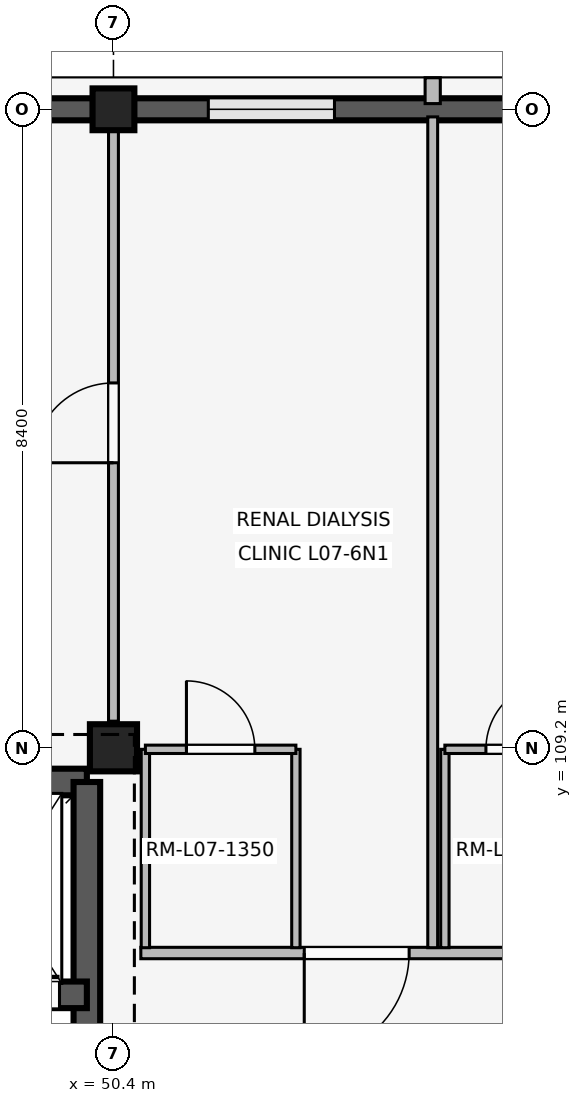
"""IFC4 building model, lengths in metres.
Left out: names, types, materials, properties, quantities, classifications, styles, units other than length and angle.
Written with IfcOpenShell. Run it as: python <this file> out.ifc"""

import sys

from ifc_helpers import new_model, si_unit, direction, frame, frame_2d, origin, origin_2d, place, context, subcontext, project, spatial, rectangle, extrude, element, fill, save


model = new_model("IFC4")
c1 = context("Model", 3, precision=1e-05, world=origin(), true_north=direction((0.0, 1.0)))
c2 = subcontext(c1, "Body", "Model", "MODEL_VIEW")
j1 = project(units=[si_unit("LENGTHUNIT", "METRE"), si_unit("PLANEANGLEUNIT", "RADIAN")], contexts=[c1])
p1 = place(None, origin())
s1 = spatial("IfcSite", under=j1, at=p1, CompositionType="ELEMENT")
p2 = place(p1, origin())
s2 = spatial("IfcBuilding", under=s1, at=p2, CompositionType="ELEMENT")
p3 = place(p2, frame((0.0, 0.0, 28.8)))
s3 = spatial("IfcBuildingStorey", under=s2, at=p3, CompositionType="ELEMENT", Elevation=28.8)
p4 = place(p3, frame((50.4, 109.2, 0.0), z_axis=(0.0, 0.0, 1.0), x_axis=(1.0, 0.0, 0.0)))
e1 = element("IfcColumn", 1, at=p4, inside=s3, PredefinedType="COLUMN", context=c2, shape_type="SweptSolid", body=[
    extrude(rectangle(XDim=0.62, YDim=0.62, at=origin_2d()), origin(), (0.0, 0.0, 1.0), 4.2),
])
p5 = place(p3, frame((50.4, 117.6, 0.0), z_axis=(0.0, 0.0, 1.0), x_axis=(1.0, 0.0, 0.0)))
e2 = element("IfcColumn", 2, at=p5, inside=s3, PredefinedType="COLUMN", context=c2, shape_type="SweptSolid", body=[
    extrude(rectangle(XDim=0.55, YDim=0.55, at=origin_2d()), origin(), (0.0, 0.0, 1.0), 4.2),
])
p6 = place(p3, frame((42.27, 117.6, 0.0), z_axis=(0.0, 0.0, 1.0), x_axis=(1.0, 0.0, 0.0)))
e3 = element("IfcWall", 3, at=p6, inside=s3, PredefinedType="SOLIDWALL", context=c2, shape_type="SweptSolid", body=[
    extrude(rectangle(XDim=7.86, YDim=0.29, at=frame_2d((3.93, 0.0))), origin(), (0.0, 0.0, 1.0), 3.34),
])
p7 = place(p6, frame((1.098, 0.0, 0.85)))
e4 = element("IfcOpeningElement", 4, at=p7, cuts=e3, PredefinedType="OPENING", context=c2, shape_type="SweptSolid", body=[
    extrude(rectangle(XDim=1.42, YDim=1.45, at=frame_2d((0.71, 0.725))), frame((0.0, 0.155, 0.0), z_axis=(0.0, -1.0, 0.0), x_axis=(1.0, 0.0, 0.0)), (0.0, 0.0, 1.0), 0.31),
])
p8 = place(p6, frame((5.342, 0.0, 0.85)))
e5 = element("IfcOpeningElement", 5, at=p8, cuts=e3, PredefinedType="OPENING", context=c2, shape_type="SweptSolid", body=[
    extrude(rectangle(XDim=1.42, YDim=1.45, at=frame_2d((0.71, 0.725))), frame((0.0, 0.155, 0.0), z_axis=(0.0, -1.0, 0.0), x_axis=(1.0, 0.0, 0.0)), (0.0, 0.0, 1.0), 0.31),
])
p9 = place(p3, frame((50.67, 117.6, 0.0), z_axis=(0.0, 0.0, 1.0), x_axis=(1.0, 0.0, 0.0)))
e6 = element("IfcWall", 6, at=p9, inside=s3, PredefinedType="SOLIDWALL", context=c2, shape_type="SweptSolid", body=[
    extrude(rectangle(XDim=7.86, YDim=0.29, at=frame_2d((3.93, 0.0))), origin(), (0.0, 0.0, 1.0), 3.34),
])
p10 = place(p9, frame((0.978, 0.0, 0.85)))
e7 = element("IfcOpeningElement", 7, at=p10, cuts=e6, PredefinedType="OPENING", context=c2, shape_type="SweptSolid", body=[
    extrude(rectangle(XDim=1.66, YDim=1.95, at=frame_2d((0.83, 0.975))), frame((0.0, 0.155, 0.0), z_axis=(0.0, -1.0, 0.0), x_axis=(1.0, 0.0, 0.0)), (0.0, 0.0, 1.0), 0.31),
])
p11 = place(p9, frame((5.222, 0.0, 0.85)))
e8 = element("IfcOpeningElement", 8, at=p11, cuts=e6, PredefinedType="OPENING", context=c2, shape_type="SweptSolid", body=[
    extrude(rectangle(XDim=1.66, YDim=1.95, at=frame_2d((0.83, 0.975))), frame((0.0, 0.155, 0.0), z_axis=(0.0, -1.0, 0.0), x_axis=(1.0, 0.0, 0.0)), (0.0, 0.0, 1.0), 0.31),
])
p12 = place(p3, frame((54.6, 117.675, 0.0), z_axis=(0.0, 0.0, 1.0), x_axis=(0.0, 1.0, 0.0)))
e9 = element("IfcWall", 9, at=p12, inside=s3, PredefinedType="ELEMENTEDWALL", context=c2, shape_type="SweptSolid", body=[
    extrude(rectangle(XDim=0.34, YDim=0.2, at=frame_2d((0.17, 0.0))), origin(), (0.0, 0.0, 1.0), 3.32),
])
p13 = place(p3, frame((42.55, 108.75, 0.0), z_axis=(0.0, 0.0, 1.0), x_axis=(1.0, 0.0, 0.0)))
e10 = element("IfcWall", 10, at=p13, inside=s3, PredefinedType="SHEAR", context=c2, shape_type="SweptSolid", body=[
    extrude(rectangle(XDim=7.5, YDim=0.35, at=frame_2d((3.75, 0.0))), origin(), (0.0, 0.0, 1.0), 3.94),
])
p14 = place(p3, frame((50.05, 101.2, 0.0), z_axis=(0.0, 0.0, 1.0), x_axis=(0.0, 1.0, 0.0)))
e11 = element("IfcWall", 11, at=p14, inside=s3, PredefinedType="SHEAR", context=c2, shape_type="SweptSolid", body=[
    extrude(rectangle(XDim=7.55, YDim=0.35, at=frame_2d((3.775, 0.0))), origin(), (0.0, 0.0, 1.0), 3.94),
])
p15 = place(p14, frame((2.4, 0.0, 0.0)))
e12 = element("IfcOpeningElement", 12, at=p15, cuts=e11, PredefinedType="OPENING", context=c2, shape_type="SweptSolid", body=[
    extrude(rectangle(XDim=1.2, YDim=2.2, at=frame_2d((0.6, 1.1))), frame((0.0, 0.185, 0.0), z_axis=(0.0, -1.0, 0.0), x_axis=(1.0, 0.0, 0.0)), (0.0, 0.0, 1.0), 0.37),
])
p16 = place(p3, frame((46.25, 105.95, 0.0), z_axis=(0.0, 0.0, 1.0), x_axis=(1.0, 0.0, 0.0)))
e13 = element("IfcWall", 13, at=p16, inside=s3, PredefinedType="SHEAR", context=c2, shape_type="SweptSolid", body=[
    extrude(rectangle(XDim=3.8, YDim=0.35, at=frame_2d((1.9, 0.0))), origin(), (0.0, 0.0, 1.0), 3.94),
])
p17 = place(p16, frame((0.32, 0.0, 0.0)))
e14 = element("IfcOpeningElement", 14, at=p17, cuts=e13, PredefinedType="OPENING", context=c2, shape_type="SweptSolid", body=[
    extrude(rectangle(XDim=1.35, YDim=2.25, at=frame_2d((0.675, 1.125))), frame((0.0, 0.185, 0.0), z_axis=(0.0, -1.0, 0.0), x_axis=(1.0, 0.0, 0.0)), (0.0, 0.0, 1.0), 0.37),
])
p18 = place(p16, frame((2.04, 0.0, 0.0)))
e15 = element("IfcOpeningElement", 15, at=p18, cuts=e13, PredefinedType="OPENING", context=c2, shape_type="SweptSolid", body=[
    extrude(rectangle(XDim=1.4, YDim=2.25, at=frame_2d((0.7, 1.125))), frame((0.0, 0.185, 0.0), z_axis=(0.0, -1.0, 0.0), x_axis=(1.0, 0.0, 0.0)), (0.0, 0.0, 1.0), 0.37),
])
p19 = place(p3, frame((50.4, 109.55, 0.0), z_axis=(0.0, 0.0, 1.0), x_axis=(0.0, 1.0, 0.0)))
e16 = element("IfcWall", 16, at=p19, inside=s3, PredefinedType="PARTITIONING", context=c2, shape_type="SweptSolid", body=[
    extrude(rectangle(XDim=7.91, YDim=0.13, at=frame_2d((3.955, 0.0))), origin(), (0.0, 0.0, 1.0), 3.32),
])
p20 = place(p19, frame((3.4, 0.0, 0.0)))
e17 = element("IfcOpeningElement", 17, at=p20, cuts=e16, PredefinedType="OPENING", context=c2, shape_type="SweptSolid", body=[
    extrude(rectangle(XDim=1.05, YDim=2.2, at=frame_2d((0.525, 1.1))), frame((0.0, 0.075, 0.0), z_axis=(0.0, -1.0, 0.0), x_axis=(1.0, 0.0, 0.0)), (0.0, 0.0, 1.0), 0.15),
])
p21 = place(p3, frame((58.72, 106.5, 0.0), z_axis=(0.0, 0.0, 1.0), x_axis=(-1.0, 0.0, 0.0)))
e18 = element("IfcWall", 18, at=p21, inside=s3, PredefinedType="PARTITIONING", context=c2, shape_type="SweptSolid", body=[
    extrude(rectangle(XDim=7.96, YDim=0.15, at=frame_2d((3.98, 0.0))), origin(), (0.0, 0.0, 1.0), 3.32),
])
p22 = place(p21, frame((0.73, 0.0, 0.0)))
e19 = element("IfcOpeningElement", 19, at=p22, cuts=e18, PredefinedType="OPENING", context=c2, shape_type="SweptSolid", body=[
    extrude(rectangle(XDim=1.38, YDim=2.25, at=frame_2d((0.69, 1.125))), frame((0.0, 0.085, 0.0), z_axis=(0.0, -1.0, 0.0), x_axis=(1.0, 0.0, 0.0)), (0.0, 0.0, 1.0), 0.17),
])
p23 = place(p21, frame((4.43, 0.0, 0.0)))
e20 = element("IfcOpeningElement", 20, at=p23, cuts=e18, PredefinedType="OPENING", context=c2, shape_type="SweptSolid", body=[
    extrude(rectangle(XDim=1.38, YDim=2.25, at=frame_2d((0.69, 1.125))), frame((0.0, 0.085, 0.0), z_axis=(0.0, -1.0, 0.0), x_axis=(1.0, 0.0, 0.0)), (0.0, 0.0, 1.0), 0.17),
])
p24 = place(p3, frame((54.6, 106.57, 0.0), z_axis=(0.0, 0.0, 1.0), x_axis=(0.0, 1.0, 0.0)))
e21 = element("IfcWall", 21, at=p24, inside=s3, PredefinedType="PARTITIONING", context=c2, shape_type="SweptSolid", body=[
    extrude(rectangle(XDim=10.93, YDim=0.13, at=frame_2d((5.465, 0.0))), origin(), (0.0, 0.0, 1.0), 3.32),
])
for number, where, z_axis, x_axis in (
    (22, (50.82, 106.57, 0.0), (0.0, 0.0, 1.0), (0.0, 1.0, 0.0)),
    (23, (52.8, 106.57, 0.0), (0.0, 0.0, 1.0), (0.0, 1.0, 0.0)),
):
    element("IfcWall", number, at=place(p3, frame(where, z_axis=z_axis, x_axis=x_axis)), inside=s3, PredefinedType="PARTITIONING", context=c2, shape_type="SweptSolid", body=[
        extrude(rectangle(XDim=2.61, YDim=0.11, at=frame_2d((1.305, 0.0))), origin(), (0.0, 0.0, 1.0), 3.32),
    ])
p25 = place(p3, frame((50.82, 109.18, 0.0), z_axis=(0.0, 0.0, 1.0), x_axis=(1.0, 0.0, 0.0)))
e24 = element("IfcWall", 24, at=p25, inside=s3, PredefinedType="PARTITIONING", context=c2, shape_type="SweptSolid", body=[
    extrude(rectangle(XDim=1.98, YDim=0.11, at=frame_2d((0.99, 0.0))), origin(), (0.0, 0.0, 1.0), 3.32),
])
p26 = place(p25, frame((0.54, 0.0, 0.0)))
e25 = element("IfcOpeningElement", 25, at=p26, cuts=e24, PredefinedType="OPENING", context=c2, shape_type="SweptSolid", body=[
    extrude(rectangle(XDim=0.9, YDim=2.1, at=frame_2d((0.45, 1.05))), frame((0.0, 0.065, 0.0), z_axis=(0.0, -1.0, 0.0), x_axis=(1.0, 0.0, 0.0)), (0.0, 0.0, 1.0), 0.13),
])
p27 = place(p3, frame((54.76, 106.57, 0.0), z_axis=(0.0, 0.0, 1.0), x_axis=(0.0, 1.0, 0.0)))
e26 = element("IfcWall", 26, at=p27, inside=s3, PredefinedType="PARTITIONING", context=c2, shape_type="SweptSolid", body=[
    extrude(rectangle(XDim=2.61, YDim=0.11, at=frame_2d((1.305, 0.0))), origin(), (0.0, 0.0, 1.0), 3.32),
])
p28 = place(p3, frame((54.76, 109.18, 0.0), z_axis=(0.0, 0.0, 1.0), x_axis=(1.0, 0.0, 0.0)))
e27 = element("IfcWall", 27, at=p28, inside=s3, PredefinedType="PARTITIONING", context=c2, shape_type="SweptSolid", body=[
    extrude(rectangle(XDim=1.98, YDim=0.11, at=frame_2d((0.99, 0.0))), origin(), (0.0, 0.0, 1.0), 3.32),
])
p29 = place(p28, frame((0.54, 0.0, 0.0)))
e28 = element("IfcOpeningElement", 28, at=p29, cuts=e27, PredefinedType="OPENING", context=c2, shape_type="SweptSolid", body=[
    extrude(rectangle(XDim=0.9, YDim=2.1, at=frame_2d((0.45, 1.05))), frame((0.0, 0.065, 0.0), z_axis=(0.0, -1.0, 0.0), x_axis=(1.0, 0.0, 0.0)), (0.0, 0.0, 1.0), 0.13),
])
p30 = place(p10, origin())
e29 = element("IfcWindow", 29, at=p30, inside=s3, PartitioningType="SINGLE_PANEL", PredefinedType="WINDOW", context=c2, shape_type="SweptSolid", body=[
    extrude(rectangle(XDim=1.66, YDim=1.95, at=frame_2d((0.83, 0.975))), frame((0.0, 0.03, 0.0), z_axis=(0.0, -1.0, 0.0), x_axis=(1.0, 0.0, 0.0)), (0.0, 0.0, 1.0), 0.06),
])
fill(e7, e29)
p31 = place(p18, origin())
e30 = element("IfcDoor", 30, at=p31, inside=s3, OperationType="SLIDING_TO_LEFT", PredefinedType="DOOR", context=c2, shape_type="SweptSolid", body=[
    extrude(rectangle(XDim=1.4, YDim=2.25, at=frame_2d((0.7, 1.125))), frame((0.0, 0.025, 0.0), z_axis=(0.0, -1.0, 0.0), x_axis=(1.0, 0.0, 0.0)), (0.0, 0.0, 1.0), 0.05),
])
fill(e15, e30)
p32 = place(p20, origin())
e31 = element("IfcDoor", 31, at=p32, inside=s3, OperationType="SINGLE_SWING_LEFT", PredefinedType="DOOR", context=c2, shape_type="SweptSolid", body=[
    extrude(rectangle(XDim=1.05, YDim=2.2, at=frame_2d((0.525, 1.1))), frame((0.0, 0.025, 0.0), z_axis=(0.0, -1.0, 0.0), x_axis=(1.0, 0.0, 0.0)), (0.0, 0.0, 1.0), 0.05),
])
fill(e17, e31)
p33 = place(p23, origin())
e32 = element("IfcDoor", 32, at=p33, inside=s3, OperationType="SINGLE_SWING_RIGHT", PredefinedType="DOOR", context=c2, shape_type="SweptSolid", body=[
    extrude(rectangle(XDim=1.38, YDim=2.25, at=frame_2d((0.69, 1.125))), frame((0.0, 0.025, 0.0), z_axis=(0.0, -1.0, 0.0), x_axis=(1.0, 0.0, 0.0)), (0.0, 0.0, 1.0), 0.05),
])
fill(e20, e32)
p34 = place(p26, origin())
e33 = element("IfcDoor", 33, at=p34, inside=s3, OperationType="SINGLE_SWING_LEFT", PredefinedType="DOOR", context=c2, shape_type="SweptSolid", body=[
    extrude(rectangle(XDim=0.9, YDim=2.1, at=frame_2d((0.45, 1.05))), frame((0.0, 0.025, 0.0), z_axis=(0.0, -1.0, 0.0), x_axis=(1.0, 0.0, 0.0)), (0.0, 0.0, 1.0), 0.05),
])
fill(e25, e33)
p35 = place(p29, origin())
e34 = element("IfcDoor", 34, at=p35, inside=s3, OperationType="SINGLE_SWING_RIGHT", PredefinedType="DOOR", context=c2, shape_type="SweptSolid", body=[
    extrude(rectangle(XDim=0.9, YDim=2.1, at=frame_2d((0.45, 1.05))), frame((0.0, 0.025, 0.0), z_axis=(0.0, -1.0, 0.0), x_axis=(1.0, 0.0, 0.0)), (0.0, 0.0, 1.0), 0.05),
])
fill(e28, e34)
save(model, sys.argv[1])
